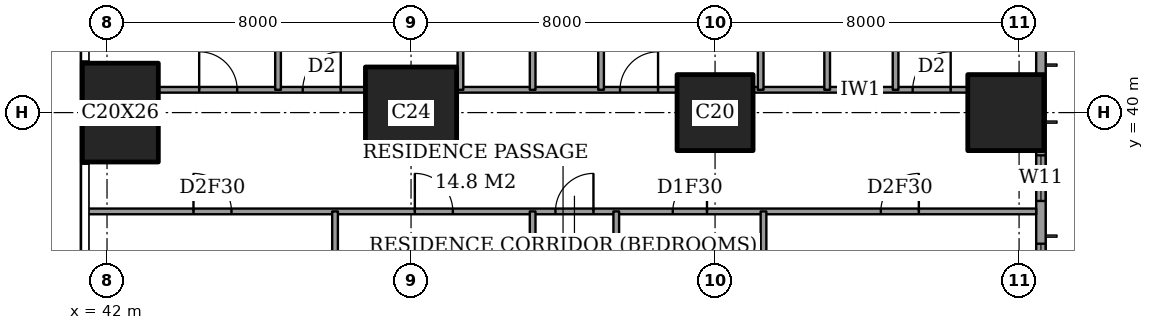
"""IFC4 building model, lengths in metres.
Left out: names, types, materials, properties, quantities, classifications, styles, units other than length and angle.
Written with IfcOpenShell. Run it as: python <this file> out.ifc"""

import sys

from ifc_helpers import new_model, si_unit, direction, frame, frame_2d, origin, origin_2d, place, context, subcontext, project, spatial, rectangle, extrude, element, fill, save


model = new_model("IFC4")
c1 = context("Model", 3, precision=1e-05, world=origin(), true_north=direction((0.0, 1.0)))
c2 = subcontext(c1, "Body", "Model", "MODEL_VIEW")
j1 = project(units=[si_unit("LENGTHUNIT", "METRE"), si_unit("PLANEANGLEUNIT", "RADIAN")], contexts=[c1])
p1 = place(None, origin())
s1 = spatial("IfcSite", under=j1, at=p1, CompositionType="ELEMENT")
p2 = place(p1, origin())
s2 = spatial("IfcBuilding", under=s1, at=p2, CompositionType="ELEMENT")
p3 = place(p2, frame((0.0, 0.0, 161.0)))
s3 = spatial("IfcBuildingStorey", under=s2, at=p3, CompositionType="ELEMENT", Elevation=161.0)
p4 = place(p3, frame((42.35, 40.0, 0.0), z_axis=(0.0, 0.0, 1.0), x_axis=(1.0, 0.0, 0.0)))
e1 = element("IfcColumn", 1, at=p4, inside=s3, PredefinedType="COLUMN", context=c2, shape_type="SweptSolid", body=[
    extrude(rectangle(XDim=2.0, YDim=2.6, at=origin_2d()), origin(), (0.0, 0.0, 1.0), 3.6),
])
p5 = place(p3, frame((50.0, 40.0, 0.0), z_axis=(0.0, 0.0, 1.0), x_axis=(1.0, 0.0, 0.0)))
e2 = element("IfcColumn", 2, at=p5, inside=s3, PredefinedType="COLUMN", context=c2, shape_type="SweptSolid", body=[
    extrude(rectangle(XDim=2.4, YDim=2.4, at=origin_2d()), origin(), (0.0, 0.0, 1.0), 3.6),
])
for number, where, z_axis, x_axis in (
    (3, (58.0, 40.0, 0.0), (0.0, 0.0, 1.0), (1.0, 0.0, 0.0)),
    (4, (65.65, 40.0, 0.0), (0.0, 0.0, 1.0), (1.0, 0.0, 0.0)),
):
    element("IfcColumn", number, at=place(p3, frame(where, z_axis=z_axis, x_axis=x_axis)), inside=s3, PredefinedType="COLUMN", context=c2, shape_type="SweptSolid", body=[
        extrude(rectangle(XDim=2.0, YDim=2.0, at=origin_2d()), origin(), (0.0, 0.0, 1.0), 3.6),
    ])
p6 = place(p3, frame((66.575, 3.175, 0.0), z_axis=(0.0, 0.0, 1.0), x_axis=(0.0, 1.0, 0.0)))
e5 = element("IfcWall", 5, at=p6, inside=s3, PredefinedType="SOLIDWALL", context=c2, shape_type="SweptSolid", body=[
    extrude(rectangle(XDim=41.65, YDim=0.25, at=frame_2d((20.825, 0.0))), origin(), (0.0, 0.0, 1.0), 3.6),
])
p7 = place(p6, frame((0.775, 0.0, 0.4)))
e6 = element("IfcOpeningElement", 6, at=p7, cuts=e5, PredefinedType="OPENING", context=c2, shape_type="SweptSolid", body=[
    extrude(rectangle(XDim=2.4, YDim=2.2, at=frame_2d((1.2, 1.1))), frame((0.0, 0.135, 0.0), z_axis=(0.0, -1.0, 0.0), x_axis=(1.0, 0.0, 0.0)), (0.0, 0.0, 1.0), 0.27),
])
p8 = place(p6, frame((6.225, 0.0, 0.4)))
e7 = element("IfcOpeningElement", 7, at=p8, cuts=e5, PredefinedType="OPENING", context=c2, shape_type="SweptSolid", body=[
    extrude(rectangle(XDim=1.2, YDim=2.2, at=frame_2d((0.6, 1.1))), frame((0.0, 0.135, 0.0), z_axis=(0.0, -1.0, 0.0), x_axis=(1.0, 0.0, 0.0)), (0.0, 0.0, 1.0), 0.27),
])
p9 = place(p6, frame((8.475, 0.0, 0.4)))
e8 = element("IfcOpeningElement", 8, at=p9, cuts=e5, PredefinedType="OPENING", context=c2, shape_type="SweptSolid", body=[
    extrude(rectangle(XDim=2.4, YDim=2.2, at=frame_2d((1.2, 1.1))), frame((0.0, 0.135, 0.0), z_axis=(0.0, -1.0, 0.0), x_axis=(1.0, 0.0, 0.0)), (0.0, 0.0, 1.0), 0.27),
])
p10 = place(p6, frame((15.775, 0.0, 0.4)))
e9 = element("IfcOpeningElement", 9, at=p10, cuts=e5, PredefinedType="OPENING", context=c2, shape_type="SweptSolid", body=[
    extrude(rectangle(XDim=2.4, YDim=2.2, at=frame_2d((1.2, 1.1))), frame((0.0, 0.135, 0.0), z_axis=(0.0, -1.0, 0.0), x_axis=(1.0, 0.0, 0.0)), (0.0, 0.0, 1.0), 0.27),
])
p11 = place(p6, frame((23.475, 0.0, 0.4)))
e10 = element("IfcOpeningElement", 10, at=p11, cuts=e5, PredefinedType="OPENING", context=c2, shape_type="SweptSolid", body=[
    extrude(rectangle(XDim=2.4, YDim=2.2, at=frame_2d((1.2, 1.1))), frame((0.0, 0.135, 0.0), z_axis=(0.0, -1.0, 0.0), x_axis=(1.0, 0.0, 0.0)), (0.0, 0.0, 1.0), 0.27),
])
p12 = place(p6, frame((30.975, 0.0, 0.4)))
e11 = element("IfcOpeningElement", 11, at=p12, cuts=e5, PredefinedType="OPENING", context=c2, shape_type="SweptSolid", body=[
    extrude(rectangle(XDim=2.4, YDim=2.2, at=frame_2d((1.2, 1.1))), frame((0.0, 0.135, 0.0), z_axis=(0.0, -1.0, 0.0), x_axis=(1.0, 0.0, 0.0)), (0.0, 0.0, 1.0), 0.27),
])
p13 = place(p6, frame((34.5, 0.0, 0.4)))
e12 = element("IfcOpeningElement", 12, at=p13, cuts=e5, PredefinedType="OPENING", context=c2, shape_type="SweptSolid", body=[
    extrude(rectangle(XDim=1.2, YDim=2.2, at=frame_2d((0.6, 1.1))), frame((0.0, 0.135, 0.0), z_axis=(0.0, -1.0, 0.0), x_axis=(1.0, 0.0, 0.0)), (0.0, 0.0, 1.0), 0.27),
])
p14 = place(p6, frame((38.475, 0.0, 0.4)))
e13 = element("IfcOpeningElement", 13, at=p14, cuts=e5, PredefinedType="OPENING", context=c2, shape_type="SweptSolid", body=[
    extrude(rectangle(XDim=2.4, YDim=2.2, at=frame_2d((1.2, 1.1))), frame((0.0, 0.135, 0.0), z_axis=(0.0, -1.0, 0.0), x_axis=(1.0, 0.0, 0.0)), (0.0, 0.0, 1.0), 0.27),
])
p15 = place(p3, frame((41.439, 37.4, 0.0), z_axis=(0.0, 0.0, 1.0), x_axis=(1.0, 0.0, 0.0)))
e14 = element("IfcWall", 14, at=p15, inside=s3, PredefinedType="PARTITIONING", context=c2, shape_type="SweptSolid", body=[
    extrude(rectangle(XDim=25.011, YDim=0.15, at=frame_2d((12.505, 0.0))), origin(), (0.0, 0.0, 1.0), 3.35),
])
p16 = place(p15, frame((12.361, 0.0, 0.0)))
e15 = element("IfcOpeningElement", 15, at=p16, cuts=e14, PredefinedType="OPENING", context=c2, shape_type="SweptSolid", body=[
    extrude(rectangle(XDim=1.0, YDim=2.1, at=frame_2d((0.5, 1.05))), frame((0.0, 0.085, 0.0), z_axis=(0.0, -1.0, 0.0), x_axis=(1.0, 0.0, 0.0)), (0.0, 0.0, 1.0), 0.17),
])
p17 = place(p15, frame((20.924, 0.0, 0.0)))
e16 = element("IfcOpeningElement", 16, at=p17, cuts=e14, PredefinedType="OPENING", context=c2, shape_type="SweptSolid", body=[
    extrude(rectangle(XDim=1.0, YDim=2.1, at=frame_2d((0.5, 1.05))), frame((0.0, 0.085, 0.0), z_axis=(0.0, -1.0, 0.0), x_axis=(1.0, 0.0, 0.0)), (0.0, 0.0, 1.0), 0.17),
])
p18 = place(p15, frame((15.448, 0.0, 0.0)))
e17 = element("IfcOpeningElement", 17, at=p18, cuts=e14, PredefinedType="OPENING", context=c2, shape_type="SweptSolid", body=[
    extrude(rectangle(XDim=0.9, YDim=2.1, at=frame_2d((0.45, 1.05))), frame((0.0, 0.085, 0.0), z_axis=(0.0, -1.0, 0.0), x_axis=(1.0, 0.0, 0.0)), (0.0, 0.0, 1.0), 0.17),
])
p19 = place(p15, frame((8.661, 0.0, 0.0)))
e18 = element("IfcOpeningElement", 18, at=p19, cuts=e14, PredefinedType="OPENING", context=c2, shape_type="SweptSolid", body=[
    extrude(rectangle(XDim=1.0, YDim=2.1, at=frame_2d((0.5, 1.05))), frame((0.0, 0.085, 0.0), z_axis=(0.0, -1.0, 0.0), x_axis=(1.0, 0.0, 0.0)), (0.0, 0.0, 1.0), 0.17),
])
p20 = place(p15, frame((2.836, 0.0, 0.0)))
e19 = element("IfcOpeningElement", 19, at=p20, cuts=e14, PredefinedType="OPENING", context=c2, shape_type="SweptSolid", body=[
    extrude(rectangle(XDim=1.0, YDim=2.1, at=frame_2d((0.5, 1.05))), frame((0.0, 0.085, 0.0), z_axis=(0.0, -1.0, 0.0), x_axis=(1.0, 0.0, 0.0)), (0.0, 0.0, 1.0), 0.17),
])
p21 = place(p3, frame((43.35, 40.6, 0.0), z_axis=(0.0, 0.0, 1.0), x_axis=(1.0, 0.0, 0.0)))
e20 = element("IfcWall", 20, at=p21, inside=s3, PredefinedType="PARTITIONING", context=c2, shape_type="SweptSolid", body=[
    extrude(rectangle(XDim=5.45, YDim=0.15, at=frame_2d((2.725, 0.0))), origin(), (0.0, 0.0, 1.0), 3.35),
])
p22 = place(p21, frame((3.8, 0.0, 0.0)))
e21 = element("IfcOpeningElement", 21, at=p22, cuts=e20, PredefinedType="OPENING", context=c2, shape_type="SweptSolid", body=[
    extrude(rectangle(XDim=1.0, YDim=2.1, at=frame_2d((0.5, 1.05))), frame((0.0, 0.085, 0.0), z_axis=(0.0, -1.0, 0.0), x_axis=(1.0, 0.0, 0.0)), (0.0, 0.0, 1.0), 0.17),
])
p23 = place(p21, frame((1.075, 0.0, 0.0)))
e22 = element("IfcOpeningElement", 22, at=p23, cuts=e20, PredefinedType="OPENING", context=c2, shape_type="SweptSolid", body=[
    extrude(rectangle(XDim=1.0, YDim=2.1, at=frame_2d((0.5, 1.05))), frame((0.0, 0.085, 0.0), z_axis=(0.0, -1.0, 0.0), x_axis=(1.0, 0.0, 0.0)), (0.0, 0.0, 1.0), 0.17),
])
p24 = place(p3, frame((51.2, 40.6, 0.0), z_axis=(0.0, 0.0, 1.0), x_axis=(1.0, 0.0, 0.0)))
e23 = element("IfcWall", 23, at=p24, inside=s3, PredefinedType="PARTITIONING", context=c2, shape_type="SweptSolid", body=[
    extrude(rectangle(XDim=5.8, YDim=0.15, at=frame_2d((2.9, 0.0))), origin(), (0.0, 0.0, 1.0), 3.35),
])
p25 = place(p24, frame((4.3, 0.0, 0.0)))
e24 = element("IfcOpeningElement", 24, at=p25, cuts=e23, PredefinedType="OPENING", context=c2, shape_type="SweptSolid", body=[
    extrude(rectangle(XDim=1.0, YDim=2.1, at=frame_2d((0.5, 1.05))), frame((0.0, 0.085, 0.0), z_axis=(0.0, -1.0, 0.0), x_axis=(1.0, 0.0, 0.0)), (0.0, 0.0, 1.0), 0.17),
])
p26 = place(p3, frame((59.0, 40.6, 0.0), z_axis=(0.0, 0.0, 1.0), x_axis=(1.0, 0.0, 0.0)))
e25 = element("IfcWall", 25, at=p26, inside=s3, PredefinedType="PARTITIONING", context=c2, shape_type="SweptSolid", body=[
    extrude(rectangle(XDim=5.65, YDim=0.15, at=frame_2d((2.825, 0.0))), origin(), (0.0, 0.0, 1.0), 3.35),
])
p27 = place(p26, frame((4.2, 0.0, 0.0)))
e26 = element("IfcOpeningElement", 26, at=p27, cuts=e25, PredefinedType="OPENING", context=c2, shape_type="SweptSolid", body=[
    extrude(rectangle(XDim=1.0, YDim=2.1, at=frame_2d((0.5, 1.05))), frame((0.0, 0.085, 0.0), z_axis=(0.0, -1.0, 0.0), x_axis=(1.0, 0.0, 0.0)), (0.0, 0.0, 1.0), 0.17),
])
p28 = place(p3, frame((46.5, 40.6, 0.0), z_axis=(0.0, 0.0, 1.0), x_axis=(0.0, 1.0, 0.0)))
e27 = element("IfcWall", 27, at=p28, inside=s3, PredefinedType="PARTITIONING", context=c2, shape_type="SweptSolid", body=[
    extrude(rectangle(XDim=7.85, YDim=0.15, at=frame_2d((3.925, 0.0))), origin(), (0.0, 0.0, 1.0), 3.35),
])
p29 = place(p3, frame((48.0, 28.0, 0.0), z_axis=(0.0, 0.0, 1.0), x_axis=(0.0, 1.0, 0.0)))
e28 = element("IfcWall", 28, at=p29, inside=s3, PredefinedType="PARTITIONING", context=c2, shape_type="SweptSolid", body=[
    extrude(rectangle(XDim=9.4, YDim=0.15, at=frame_2d((4.7, 0.0))), origin(), (0.0, 0.0, 1.0), 3.35),
])
p30 = place(p29, frame((0.837, 0.0, 0.0)))
e29 = element("IfcOpeningElement", 29, at=p30, cuts=e28, PredefinedType="OPENING", context=c2, shape_type="SweptSolid", body=[
    extrude(rectangle(XDim=1.0, YDim=2.1, at=frame_2d((0.5, 1.05))), frame((0.0, 0.085, 0.0), z_axis=(0.0, -1.0, 0.0), x_axis=(1.0, 0.0, 0.0)), (0.0, 0.0, 1.0), 0.17),
])
p31 = place(p3, frame((51.3, 40.6, 0.0), z_axis=(0.0, 0.0, 1.0), x_axis=(0.0, 1.0, 0.0)))
e30 = element("IfcWall", 30, at=p31, inside=s3, PredefinedType="PARTITIONING", context=c2, shape_type="SweptSolid", body=[
    extrude(rectangle(XDim=7.85, YDim=0.15, at=frame_2d((3.925, 0.0))), origin(), (0.0, 0.0, 1.0), 3.35),
])
p32 = place(p31, frame((3.475, 0.0, 0.0)))
e31 = element("IfcOpeningElement", 31, at=p32, cuts=e30, PredefinedType="OPENING", context=c2, shape_type="SweptSolid", body=[
    extrude(rectangle(XDim=0.9, YDim=2.1, at=frame_2d((0.45, 1.05))), frame((0.0, 0.085, 0.0), z_axis=(0.0, -1.0, 0.0), x_axis=(1.0, 0.0, 0.0)), (0.0, 0.0, 1.0), 0.17),
])
p33 = place(p3, frame((53.2, 30.675, 0.0), z_axis=(0.0, 0.0, 1.0), x_axis=(0.0, 1.0, 0.0)))
e32 = element("IfcWall", 32, at=p33, inside=s3, PredefinedType="PARTITIONING", context=c2, shape_type="SweptSolid", body=[
    extrude(rectangle(XDim=6.725, YDim=0.15, at=frame_2d((3.362, 0.0))), origin(), (0.0, 0.0, 1.0), 3.35),
])
p34 = place(p3, frame((53.2, 40.6, 0.0), z_axis=(0.0, 0.0, 1.0), x_axis=(0.0, 1.0, 0.0)))
e33 = element("IfcWall", 33, at=p34, inside=s3, PredefinedType="PARTITIONING", context=c2, shape_type="SweptSolid", body=[
    extrude(rectangle(XDim=7.85, YDim=0.15, at=frame_2d((3.925, 0.0))), origin(), (0.0, 0.0, 1.0), 3.35),
])
p35 = place(p3, frame((55.0, 40.6, 0.0), z_axis=(0.0, 0.0, 1.0), x_axis=(0.0, 1.0, 0.0)))
e34 = element("IfcWall", 34, at=p35, inside=s3, PredefinedType="PARTITIONING", context=c2, shape_type="SweptSolid", body=[
    extrude(rectangle(XDim=7.85, YDim=0.15, at=frame_2d((3.925, 0.0))), origin(), (0.0, 0.0, 1.0), 3.35),
])
p36 = place(p35, frame((3.475, 0.0, 0.0)))
e35 = element("IfcOpeningElement", 35, at=p36, cuts=e34, PredefinedType="OPENING", context=c2, shape_type="SweptSolid", body=[
    extrude(rectangle(XDim=0.9, YDim=2.1, at=frame_2d((0.45, 1.05))), frame((0.0, 0.085, 0.0), z_axis=(0.0, -1.0, 0.0), x_axis=(1.0, 0.0, 0.0)), (0.0, 0.0, 1.0), 0.17),
])
p37 = place(p3, frame((55.4, 28.0, 0.0), z_axis=(0.0, 0.0, 1.0), x_axis=(0.0, 1.0, 0.0)))
e36 = element("IfcWall", 36, at=p37, inside=s3, PredefinedType="PARTITIONING", context=c2, shape_type="SweptSolid", body=[
    extrude(rectangle(XDim=9.4, YDim=0.15, at=frame_2d((4.7, 0.0))), origin(), (0.0, 0.0, 1.0), 3.35),
])
p38 = place(p37, frame((0.837, 0.0, 0.0)))
e37 = element("IfcOpeningElement", 37, at=p38, cuts=e36, PredefinedType="OPENING", context=c2, shape_type="SweptSolid", body=[
    extrude(rectangle(XDim=1.0, YDim=2.1, at=frame_2d((0.5, 1.05))), frame((0.0, 0.085, 0.0), z_axis=(0.0, -1.0, 0.0), x_axis=(1.0, 0.0, 0.0)), (0.0, 0.0, 1.0), 0.17),
])
p39 = place(p3, frame((59.2, 40.6, 0.0), z_axis=(0.0, 0.0, 1.0), x_axis=(0.0, 1.0, 0.0)))
e38 = element("IfcWall", 38, at=p39, inside=s3, PredefinedType="PARTITIONING", context=c2, shape_type="SweptSolid", body=[
    extrude(rectangle(XDim=7.85, YDim=0.15, at=frame_2d((3.925, 0.0))), origin(), (0.0, 0.0, 1.0), 3.35),
])
p40 = place(p3, frame((59.275, 33.2, 0.0), z_axis=(0.0, 0.0, 1.0), x_axis=(0.0, 1.0, 0.0)))
e39 = element("IfcWall", 39, at=p40, inside=s3, PredefinedType="PARTITIONING", context=c2, shape_type="SweptSolid", body=[
    extrude(rectangle(XDim=4.2, YDim=0.15, at=frame_2d((2.1, 0.0))), origin(), (0.0, 0.0, 1.0), 3.35),
])
p41 = place(p3, frame((60.95, 40.6, 0.0), z_axis=(0.0, 0.0, 1.0), x_axis=(0.0, 1.0, 0.0)))
e40 = element("IfcWall", 40, at=p41, inside=s3, PredefinedType="PARTITIONING", context=c2, shape_type="SweptSolid", body=[
    extrude(rectangle(XDim=7.85, YDim=0.15, at=frame_2d((3.925, 0.0))), origin(), (0.0, 0.0, 1.0), 3.35),
])
p42 = place(p41, frame((5.225, 0.0, 0.0)))
e41 = element("IfcOpeningElement", 41, at=p42, cuts=e40, PredefinedType="OPENING", context=c2, shape_type="SweptSolid", body=[
    extrude(rectangle(XDim=0.9, YDim=2.1, at=frame_2d((0.45, 1.05))), frame((0.0, 0.085, 0.0), z_axis=(0.0, -1.0, 0.0), x_axis=(1.0, 0.0, 0.0)), (0.0, 0.0, 1.0), 0.17),
])
p43 = place(p3, frame((62.75, 40.6, 0.0), z_axis=(0.0, 0.0, 1.0), x_axis=(0.0, 1.0, 0.0)))
e42 = element("IfcWall", 42, at=p43, inside=s3, PredefinedType="PARTITIONING", context=c2, shape_type="SweptSolid", body=[
    extrude(rectangle(XDim=3.5, YDim=0.15, at=frame_2d((1.75, 0.0))), origin(), (0.0, 0.0, 1.0), 3.35),
])
p44 = place(p43, frame((1.3, 0.0, 0.0)))
e43 = element("IfcOpeningElement", 43, at=p44, cuts=e42, PredefinedType="OPENING", context=c2, shape_type="SweptSolid", body=[
    extrude(rectangle(XDim=0.9, YDim=2.1, at=frame_2d((0.45, 1.05))), frame((0.0, 0.085, 0.0), z_axis=(0.0, -1.0, 0.0), x_axis=(1.0, 0.0, 0.0)), (0.0, 0.0, 1.0), 0.17),
])
p45 = place(p12, origin())
e44 = element("IfcWindow", 44, at=p45, inside=s3, PartitioningType="SINGLE_PANEL", PredefinedType="WINDOW", context=c2, shape_type="SweptSolid", body=[
    extrude(rectangle(XDim=2.4, YDim=2.2, at=frame_2d((1.2, 1.1))), frame((0.0, 0.03, 0.0), z_axis=(0.0, -1.0, 0.0), x_axis=(1.0, 0.0, 0.0)), (0.0, 0.0, 1.0), 0.06),
])
fill(e11, e44)
p46 = place(p13, origin())
e45 = element("IfcWindow", 45, at=p46, inside=s3, PartitioningType="SINGLE_PANEL", PredefinedType="WINDOW", context=c2, shape_type="SweptSolid", body=[
    extrude(rectangle(XDim=1.2, YDim=2.2, at=frame_2d((0.6, 1.1))), frame((0.0, 0.03, 0.0), z_axis=(0.0, -1.0, 0.0), x_axis=(1.0, 0.0, 0.0)), (0.0, 0.0, 1.0), 0.06),
])
fill(e12, e45)
p47 = place(p27, origin())
e46 = element("IfcDoor", 46, at=p47, inside=s3, OperationType="SINGLE_SWING_LEFT", PredefinedType="DOOR", context=c2, shape_type="SweptSolid", body=[
    extrude(rectangle(XDim=1.0, YDim=2.1, at=frame_2d((0.5, 1.05))), frame((0.0, 0.025, 0.0), z_axis=(0.0, -1.0, 0.0), x_axis=(1.0, 0.0, 0.0)), (0.0, 0.0, 1.0), 0.05),
])
fill(e26, e46)
p48 = place(p25, origin())
e47 = element("IfcDoor", 47, at=p48, inside=s3, OperationType="SINGLE_SWING_LEFT", PredefinedType="DOOR", context=c2, shape_type="SweptSolid", body=[
    extrude(rectangle(XDim=1.0, YDim=2.1, at=frame_2d((0.5, 1.05))), frame((0.0, 0.025, 0.0), z_axis=(0.0, -1.0, 0.0), x_axis=(1.0, 0.0, 0.0)), (0.0, 0.0, 1.0), 0.05),
])
fill(e24, e47)
p49 = place(p22, origin())
e48 = element("IfcDoor", 48, at=p49, inside=s3, OperationType="SINGLE_SWING_LEFT", PredefinedType="DOOR", context=c2, shape_type="SweptSolid", body=[
    extrude(rectangle(XDim=1.0, YDim=2.1, at=frame_2d((0.5, 1.05))), frame((0.0, 0.025, 0.0), z_axis=(0.0, -1.0, 0.0), x_axis=(1.0, 0.0, 0.0)), (0.0, 0.0, 1.0), 0.05),
])
fill(e21, e48)
p50 = place(p23, origin())
e49 = element("IfcDoor", 49, at=p50, inside=s3, OperationType="SINGLE_SWING_RIGHT", PredefinedType="DOOR", context=c2, shape_type="SweptSolid", body=[
    extrude(rectangle(XDim=1.0, YDim=2.1, at=frame_2d((0.5, 1.05))), frame((0.0, 0.025, 0.0), z_axis=(0.0, -1.0, 0.0), x_axis=(1.0, 0.0, 0.0)), (0.0, 0.0, 1.0), 0.05),
])
fill(e22, e49)
p51 = place(p16, origin())
e50 = element("IfcDoor", 50, at=p51, inside=s3, OperationType="SINGLE_SWING_LEFT", PredefinedType="DOOR", context=c2, shape_type="SweptSolid", body=[
    extrude(rectangle(XDim=1.0, YDim=2.1, at=frame_2d((0.5, 1.05))), frame((0.0, 0.025, 0.0), z_axis=(0.0, -1.0, 0.0), x_axis=(1.0, 0.0, 0.0)), (0.0, 0.0, 1.0), 0.05),
])
fill(e15, e50)
p52 = place(p17, origin())
e51 = element("IfcDoor", 51, at=p52, inside=s3, OperationType="SINGLE_SWING_LEFT", PredefinedType="DOOR", context=c2, shape_type="SweptSolid", body=[
    extrude(rectangle(XDim=1.0, YDim=2.1, at=frame_2d((0.5, 1.05))), frame((0.0, 0.025, 0.0), z_axis=(0.0, -1.0, 0.0), x_axis=(1.0, 0.0, 0.0)), (0.0, 0.0, 1.0), 0.05),
])
fill(e16, e51)
p53 = place(p18, origin())
e52 = element("IfcDoor", 52, at=p53, inside=s3, OperationType="SINGLE_SWING_LEFT", PredefinedType="DOOR", context=c2, shape_type="SweptSolid", body=[
    extrude(rectangle(XDim=0.9, YDim=2.1, at=frame_2d((0.45, 1.05))), frame((0.0, 0.025, 0.0), z_axis=(0.0, -1.0, 0.0), x_axis=(1.0, 0.0, 0.0)), (0.0, 0.0, 1.0), 0.05),
])
fill(e17, e52)
p54 = place(p19, origin())
e53 = element("IfcDoor", 53, at=p54, inside=s3, OperationType="SINGLE_SWING_RIGHT", PredefinedType="DOOR", context=c2, shape_type="SweptSolid", body=[
    extrude(rectangle(XDim=1.0, YDim=2.1, at=frame_2d((0.5, 1.05))), frame((0.0, 0.025, 0.0), z_axis=(0.0, -1.0, 0.0), x_axis=(1.0, 0.0, 0.0)), (0.0, 0.0, 1.0), 0.05),
])
fill(e18, e53)
p55 = place(p20, origin())
e54 = element("IfcDoor", 54, at=p55, inside=s3, OperationType="SINGLE_SWING_RIGHT", PredefinedType="DOOR", context=c2, shape_type="SweptSolid", body=[
    extrude(rectangle(XDim=1.0, YDim=2.1, at=frame_2d((0.5, 1.05))), frame((0.0, 0.025, 0.0), z_axis=(0.0, -1.0, 0.0), x_axis=(1.0, 0.0, 0.0)), (0.0, 0.0, 1.0), 0.05),
])
fill(e19, e54)
save(model, sys.argv[1])
